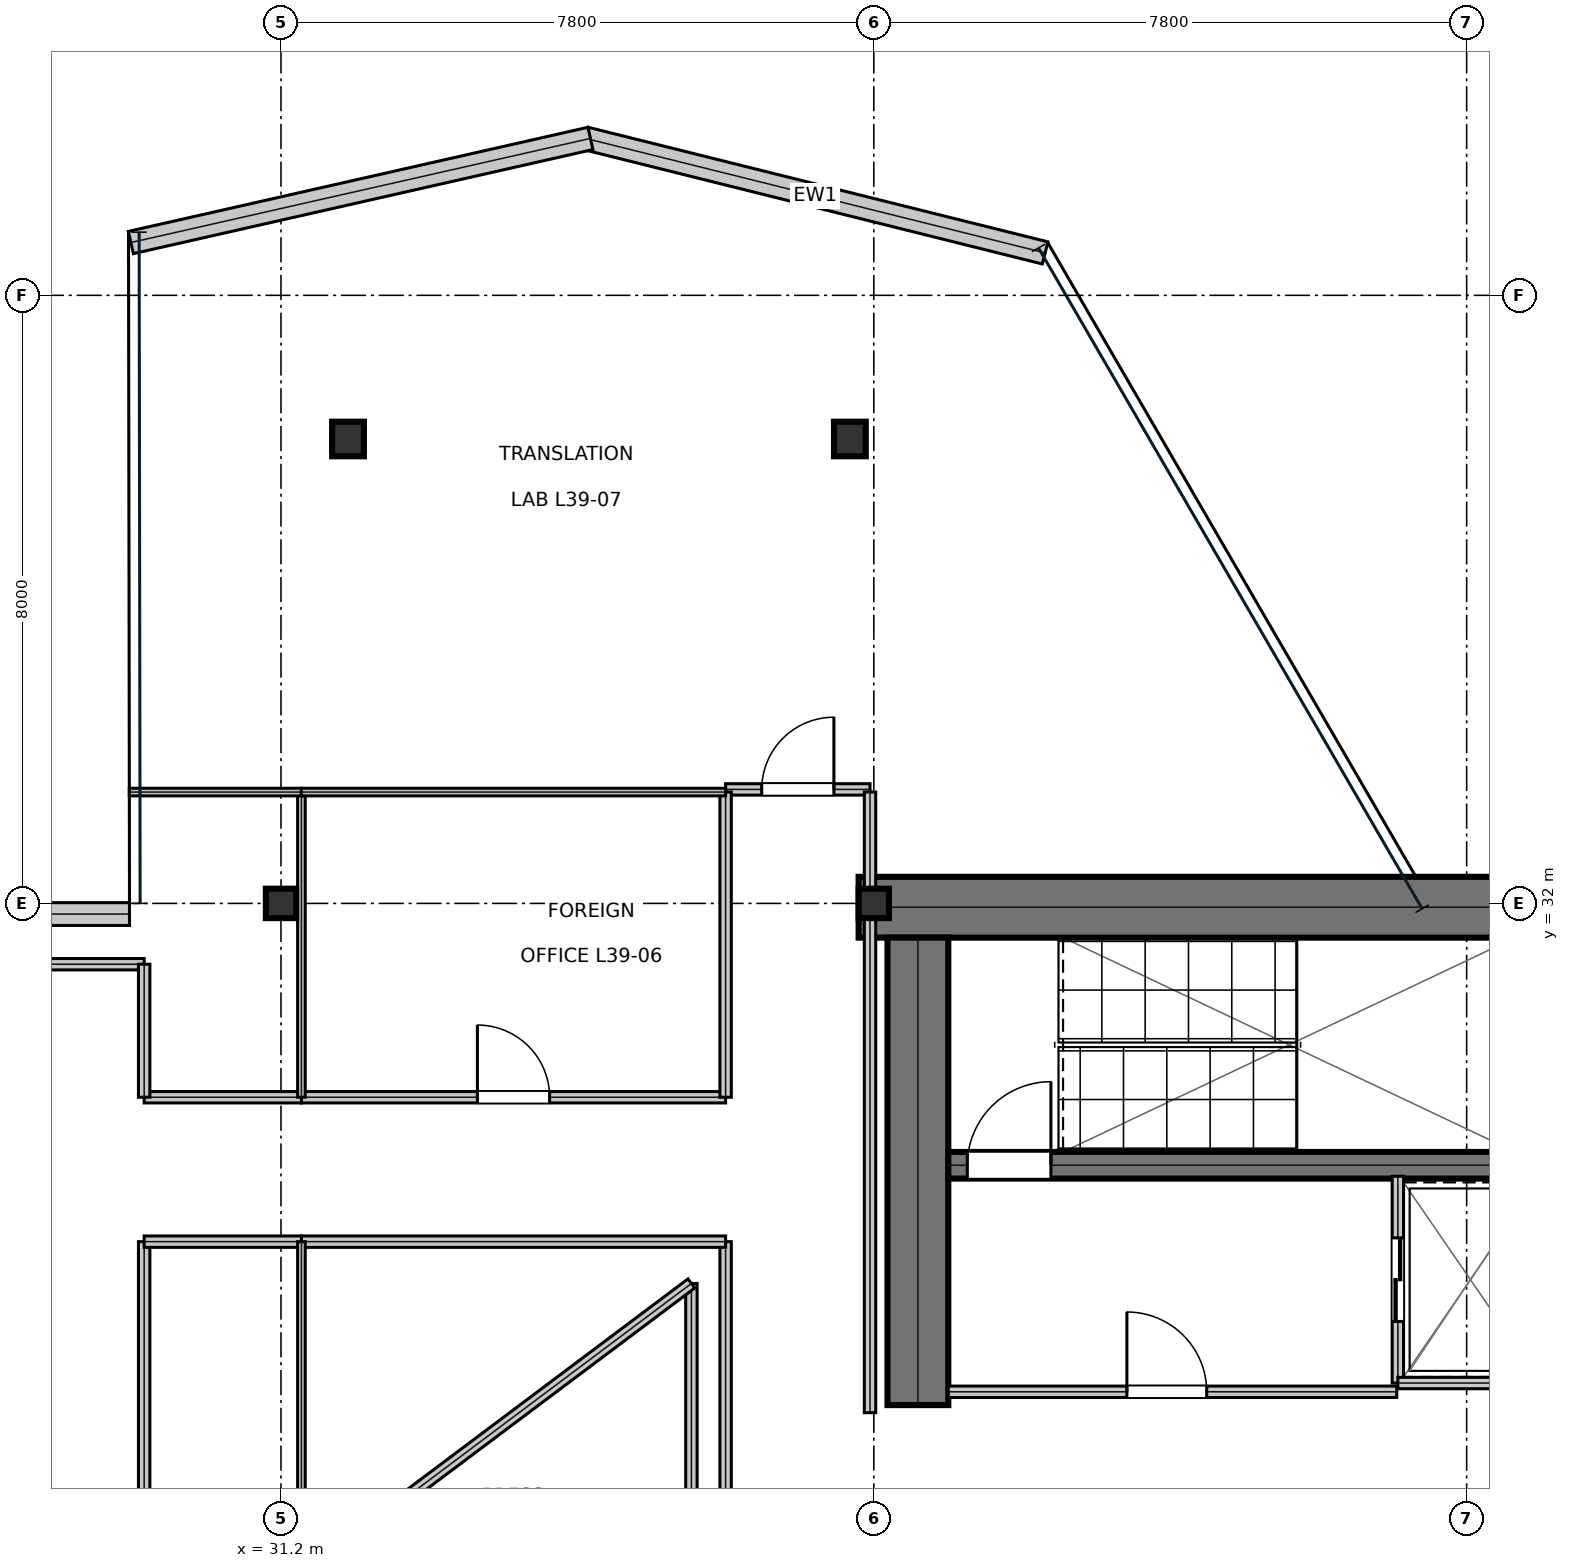
"""IFC4 building model, lengths in metres.
Left out: names, types, materials, properties, quantities, classifications, styles, units other than length and angle.
Written with IfcOpenShell. Run it as: python <this file> out.ifc"""

import sys

from ifc_helpers import new_model, si_unit, direction, frame, frame_2d, origin, origin_2d, place, context, subcontext, project, spatial, rectangle, i_section, extrude, element, fill, save


model = new_model("IFC4")
c1 = context("Model", 3, precision=1e-05, world=origin(), true_north=direction((0.0, 1.0)))
c2 = subcontext(c1, "Body", "Model", "MODEL_VIEW")
j1 = project(units=[si_unit("LENGTHUNIT", "METRE"), si_unit("PLANEANGLEUNIT", "RADIAN")], contexts=[c1])
p1 = place(None, origin())
s1 = spatial("IfcSite", under=j1, at=p1, CompositionType="ELEMENT")
p2 = place(p1, origin())
s2 = spatial("IfcBuilding", under=s1, at=p2, CompositionType="ELEMENT")
p3 = place(p2, frame((0.0, 0.0, 169.5)))
s3 = spatial("IfcBuildingStorey", under=s2, at=p3, CompositionType="ELEMENT", Elevation=169.5)
p4 = place(p3, frame((38.8, 31.95, 0.0), z_axis=(0.0, 0.0, 1.0), x_axis=(1.0, 0.0, 0.0)))
e1 = element("IfcWall", 1, at=p4, inside=s3, PredefinedType="SHEAR", context=c2, shape_type="SweptSolid", body=[
    extrude(rectangle(XDim=16.0, YDim=0.8, at=frame_2d((8.0, 0.0))), origin(), (0.0, 0.0, 1.0), 3.81),
])
p5 = place(p3, frame((39.58, 25.4, 0.0), z_axis=(0.0, 0.0, 1.0), x_axis=(0.0, 1.0, 0.0)))
e2 = element("IfcWall", 2, at=p5, inside=s3, PredefinedType="SHEAR", context=c2, shape_type="SweptSolid", body=[
    extrude(rectangle(XDim=6.15, YDim=0.8, at=frame_2d((3.075, 0.0))), origin(), (0.0, 0.0, 1.0), 3.81),
])
p6 = place(p3, frame((39.98, 28.555, 0.0), z_axis=(0.0, 0.0, 1.0), x_axis=(1.0, 0.0, 0.0)))
e3 = element("IfcWall", 3, at=p6, inside=s3, PredefinedType="SHEAR", context=c2, shape_type="SweptSolid", body=[
    extrude(rectangle(XDim=7.71, YDim=0.35, at=frame_2d((3.855, 0.0))), origin(), (0.0, 0.0, 1.0), 3.81),
])
p7 = place(p6, frame((0.25, 0.0, 0.0)))
e4 = element("IfcOpeningElement", 4, at=p7, cuts=e3, PredefinedType="OPENING", context=c2, shape_type="SweptSolid", body=[
    extrude(rectangle(XDim=1.1, YDim=2.15, at=frame_2d((0.55, 1.075))), frame((0.0, 0.185, 0.0), z_axis=(0.0, -1.0, 0.0), x_axis=(1.0, 0.0, 0.0)), (0.0, 0.0, 1.0), 0.37),
])
for number, where, z_axis, x_axis in (
    (5, (31.2, 32.0, 0.0), (0.0, 0.0, 1.0), (1.0, 0.0, 0.0)),
    (6, (39.0, 32.0, 0.0), (0.0, 0.0, 1.0), (1.0, 0.0, 0.0)),
):
    element("IfcColumn", number, at=place(p3, frame(where, z_axis=z_axis, x_axis=x_axis)), inside=s3, PredefinedType="COLUMN", context=c2, shape_type="SweptSolid", body=[
        extrude(i_section(OverallWidth=0.398, OverallDepth=0.387, WebThickness=0.021, FlangeThickness=0.033, at=origin_2d()), origin(), (0.0, 0.0, 1.0), 4.044),
    ])
for number, where, z_axis, x_axis in (
    (7, (32.082, 38.11, 0.016), (0.0, 0.0, 1.0), (1.0, 0.0, 0.0)),
    (8, (38.685, 38.11, 0.016), (0.0, 0.0, 1.0), (1.0, 0.0, 0.0)),
):
    element("IfcColumn", number, at=place(p3, frame(where, z_axis=z_axis, x_axis=x_axis)), inside=s3, PredefinedType="COLUMN", context=c2, shape_type="SweptSolid", body=[
        extrude(i_section(OverallWidth=0.418, OverallDepth=0.455, WebThickness=0.042, FlangeThickness=0.068, at=origin_2d()), origin(), (0.0, 0.0, 1.0), 4.018),
    ])
p8 = place(p3, frame((41.254, 40.558, 0.0), z_axis=(0.0, 0.0, 1.0), x_axis=(-0.970319679145, 0.241825805619, 0.0)))
e9 = element("IfcWall", 9, at=p8, inside=s3, PredefinedType="STANDARD", context=c2, shape_type="SweptSolid", body=[
    extrude(rectangle(XDim=6.232, YDim=0.3, at=frame_2d((3.116, 0.0))), origin(), (0.0, 0.0, 1.0), 3.81),
])
p9 = place(p3, frame((35.272, 42.064, 0.0), z_axis=(0.0, 0.0, 1.0), x_axis=(-0.975288491541, -0.220935190199, 0.0)))
e10 = element("IfcWall", 10, at=p9, inside=s3, PredefinedType="STANDARD", context=c2, shape_type="SweptSolid", body=[
    extrude(rectangle(XDim=6.2, YDim=0.3, at=frame_2d((3.1, 0.0))), origin(), (0.0, 0.0, 1.0), 3.81),
])
p10 = place(p3, frame((29.207, 31.86, 0.0), z_axis=(0.0, 0.0, 1.0), x_axis=(-1.0, 0.0, 0.0)))
e11 = element("IfcWall", 11, at=p10, inside=s3, PredefinedType="STANDARD", context=c2, shape_type="SweptSolid", body=[
    extrude(rectangle(XDim=2.799, YDim=0.3, at=frame_2d((1.399, 0.0))), origin(), (0.0, 0.0, 1.0), 3.81),
])
p11 = place(p3, frame((39.98, 25.575, 0.0), z_axis=(0.0, 0.0, 1.0), x_axis=(1.0, 0.0, 0.0)))
e12 = element("IfcWall", 12, at=p11, inside=s3, PredefinedType="PARTITIONING", context=c2, shape_type="SweptSolid", body=[
    extrude(rectangle(XDim=5.9, YDim=0.15, at=frame_2d((2.95, 0.0))), origin(), (0.0, 0.0, 1.0), 3.81),
])
p12 = place(p11, frame((2.35, 0.0, 0.0)))
e13 = element("IfcOpeningElement", 13, at=p12, cuts=e12, PredefinedType="OPENING", context=c2, shape_type="SweptSolid", body=[
    extrude(rectangle(XDim=1.05, YDim=2.15, at=frame_2d((0.525, 1.075))), frame((0.0, 0.085, 0.0), z_axis=(0.0, -1.0, 0.0), x_axis=(1.0, 0.0, 0.0)), (0.0, 0.0, 1.0), 0.17),
])
p13 = place(p3, frame((45.895, 25.69, 0.0), z_axis=(0.0, 0.0, 1.0), x_axis=(0.0, 1.0, 0.0)))
e14 = element("IfcWall", 14, at=p13, inside=s3, PredefinedType="PARTITIONING", context=c2, shape_type="SweptSolid", body=[
    extrude(rectangle(XDim=2.72, YDim=0.15, at=frame_2d((1.36, 0.0))), origin(), (0.0, 0.0, 1.0), 3.81),
])
p14 = place(p13, frame((0.81, 0.0, 0.0)))
e15 = element("IfcOpeningElement", 15, at=p14, cuts=e14, PredefinedType="OPENING", context=c2, shape_type="SweptSolid", body=[
    extrude(rectangle(XDim=1.1, YDim=2.15, at=frame_2d((0.55, 1.075))), frame((0.0, 0.085, 0.0), z_axis=(0.0, -1.0, 0.0), x_axis=(1.0, 0.0, 0.0)), (0.0, 0.0, 1.0), 0.17),
])
p15 = place(p3, frame((45.895, 25.69, 0.0), z_axis=(0.0, 0.0, 1.0), x_axis=(1.0, 0.0, 0.0)))
e16 = element("IfcWall", 16, at=p15, inside=s3, PredefinedType="PARTITIONING", context=c2, shape_type="SweptSolid", body=[
    extrude(rectangle(XDim=1.915, YDim=0.15, at=frame_2d((0.958, 0.0))), origin(), (0.0, 0.0, 1.0), 3.81),
])
p16 = place(p3, frame((37.05, 14.535, 0.0), z_axis=(0.0, 0.0, 1.0), x_axis=(0.0, 1.0, 0.0)))
e17 = element("IfcWall", 17, at=p16, inside=s3, PredefinedType="PARTITIONING", context=c2, shape_type="SweptSolid", body=[
    extrude(rectangle(XDim=13.015, YDim=0.15, at=frame_2d((6.508, 0.0))), origin(), (0.0, 0.0, 1.0), 3.19),
])
p17 = place(p16, frame((4.593, 0.0, 0.0)))
e18 = element("IfcOpeningElement", 18, at=p17, cuts=e17, PredefinedType="OPENING", context=c2, shape_type="SweptSolid", body=[
    extrude(rectangle(XDim=0.95, YDim=2.15, at=frame_2d((0.475, 1.075))), frame((0.0, 0.085, 0.0), z_axis=(0.0, -1.0, 0.0), x_axis=(1.0, 0.0, 0.0)), (0.0, 0.0, 1.0), 0.17),
])
p18 = place(p3, frame((29.4, 16.8, 0.0), z_axis=(0.0, 0.0, 1.0), x_axis=(0.0, 1.0, 0.0)))
e19 = element("IfcWall", 19, at=p18, inside=s3, PredefinedType="PARTITIONING", context=c2, shape_type="SweptSolid", body=[
    extrude(rectangle(XDim=10.75, YDim=0.15, at=frame_2d((5.375, 0.0))), origin(), (0.0, 0.0, 1.0), 3.19),
])
p19 = place(p18, frame((4.54, 0.0, 0.0)))
e20 = element("IfcOpeningElement", 20, at=p19, cuts=e19, PredefinedType="OPENING", context=c2, shape_type="SweptSolid", body=[
    extrude(rectangle(XDim=0.95, YDim=2.15, at=frame_2d((0.475, 1.075))), frame((0.0, 0.085, 0.0), z_axis=(0.0, -1.0, 0.0), x_axis=(1.0, 0.0, 0.0)), (0.0, 0.0, 1.0), 0.17),
])
p20 = place(p3, frame((31.469, 29.45, 0.0), z_axis=(0.0, 0.0, 1.0), x_axis=(1.0, 0.0, 0.0)))
e21 = element("IfcWall", 21, at=p20, inside=s3, PredefinedType="PARTITIONING", context=c2, shape_type="SweptSolid", body=[
    extrude(rectangle(XDim=5.581, YDim=0.15, at=frame_2d((2.791, 0.0))), origin(), (0.0, 0.0, 1.0), 3.81),
])
p21 = place(p20, frame((2.315, 0.0, 0.0)))
e22 = element("IfcOpeningElement", 22, at=p21, cuts=e21, PredefinedType="OPENING", context=c2, shape_type="SweptSolid", body=[
    extrude(rectangle(XDim=0.95, YDim=2.15, at=frame_2d((0.475, 1.075))), frame((0.0, 0.085, 0.0), z_axis=(0.0, -1.0, 0.0), x_axis=(1.0, 0.0, 0.0)), (0.0, 0.0, 1.0), 0.17),
])
p22 = place(p3, frame((37.05, 33.5, 0.0), z_axis=(0.0, 0.0, 1.0), x_axis=(1.0, 0.0, 0.0)))
e23 = element("IfcWall", 23, at=p22, inside=s3, PredefinedType="PARTITIONING", context=c2, shape_type="SweptSolid", body=[
    extrude(rectangle(XDim=1.9, YDim=0.15, at=frame_2d((0.95, 0.0))), origin(), (0.0, 0.0, 1.0), 3.19),
])
p23 = place(p22, frame((0.475, 0.0, 0.0)))
e24 = element("IfcOpeningElement", 24, at=p23, cuts=e23, PredefinedType="OPENING", context=c2, shape_type="SweptSolid", body=[
    extrude(rectangle(XDim=0.95, YDim=2.15, at=frame_2d((0.475, 1.075))), frame((0.0, 0.085, 0.0), z_axis=(0.0, -1.0, 0.0), x_axis=(1.0, 0.0, 0.0)), (0.0, 0.0, 1.0), 0.17),
])
p24 = place(p3, frame((31.469, 27.55, 0.0), z_axis=(0.0, 0.0, 1.0), x_axis=(1.0, 0.0, 0.0)))
e25 = element("IfcWall", 25, at=p24, inside=s3, PredefinedType="PARTITIONING", context=c2, shape_type="SweptSolid", body=[
    extrude(rectangle(XDim=5.581, YDim=0.15, at=frame_2d((2.791, 0.0))), origin(), (0.0, 0.0, 1.0), 3.443),
])
for number, where, z_axis, x_axis in (
    (26, (29.4, 27.55, 0.0), (0.0, 0.0, 1.0), (1.0, 0.0, 0.0)),
    (27, (29.4, 29.45, 0.0), (0.0, 0.0, 1.0), (1.0, 0.0, 0.0)),
):
    element("IfcWall", number, at=place(p3, frame(where, z_axis=z_axis, x_axis=x_axis)), inside=s3, PredefinedType="PARTITIONING", context=c2, shape_type="SweptSolid", body=[
        extrude(rectangle(XDim=2.069, YDim=0.15, at=frame_2d((1.035, 0.0))), origin(), (0.0, 0.0, 1.0), 3.19),
    ])
p25 = place(p3, frame((27.5, 31.2, 0.0), z_axis=(0.0, 0.0, 1.0), x_axis=(1.0, 0.0, 0.0)))
e28 = element("IfcWall", 28, at=p25, inside=s3, PredefinedType="PARTITIONING", context=c2, shape_type="SweptSolid", body=[
    extrude(rectangle(XDim=1.9, YDim=0.15, at=frame_2d((0.95, 0.0))), origin(), (0.0, 0.0, 1.0), 3.338),
])
p26 = place(p3, frame((29.4, 29.45, 0.0), z_axis=(0.0, 0.0, 1.0), x_axis=(0.0, 1.0, 0.0)))
e29 = element("IfcWall", 29, at=p26, inside=s3, PredefinedType="PARTITIONING", context=c2, shape_type="SweptSolid", body=[
    extrude(rectangle(XDim=1.75, YDim=0.15, at=frame_2d((0.875, 0.0))), origin(), (0.0, 0.0, 1.0), 3.81),
])
p27 = place(p3, frame((37.05, 29.45, 0.0), z_axis=(0.0, 0.0, 1.0), x_axis=(0.0, 1.0, 0.0)))
e30 = element("IfcWall", 30, at=p27, inside=s3, PredefinedType="PARTITIONING", context=c2, shape_type="SweptSolid", body=[
    extrude(rectangle(XDim=4.015, YDim=0.15, at=frame_2d((2.008, 0.0))), origin(), (0.0, 0.0, 1.0), 3.19),
])
p28 = place(p3, frame((38.95, 25.3, 0.0), z_axis=(0.0, 0.0, 1.0), x_axis=(0.0, 1.0, 0.0)))
e31 = element("IfcWall", 31, at=p28, inside=s3, PredefinedType="PARTITIONING", context=c2, shape_type="SweptSolid", body=[
    extrude(rectangle(XDim=8.165, YDim=0.15, at=frame_2d((4.083, 0.0))), origin(), (0.0, 0.0, 1.0), 3.19),
])
p29 = place(p3, frame((31.469, 14.535, 0.0), z_axis=(0.0, 0.0, 1.0), x_axis=(0.0, 1.0, 0.0)))
e32 = element("IfcWall", 32, at=p29, inside=s3, PredefinedType="PARTITIONING", context=c2, shape_type="SweptSolid", body=[
    extrude(rectangle(XDim=13.015, YDim=0.1, at=frame_2d((6.508, 0.0))), origin(), (0.0, 0.0, 1.0), 3.19),
])
p30 = place(p3, frame((31.469, 29.45, 0.0), z_axis=(0.0, 0.0, 1.0), x_axis=(0.0, 1.0, 0.0)))
e33 = element("IfcWall", 33, at=p30, inside=s3, PredefinedType="PARTITIONING", context=c2, shape_type="SweptSolid", body=[
    extrude(rectangle(XDim=4.015, YDim=0.1, at=frame_2d((2.008, 0.0))), origin(), (0.0, 0.0, 1.0), 3.19),
])
p31 = place(p3, frame((29.205, 33.465, 0.0), z_axis=(0.0, 0.0, 1.0), x_axis=(1.0, 0.0, 0.0)))
e34 = element("IfcWall", 34, at=p31, inside=s3, PredefinedType="PARTITIONING", context=c2, shape_type="SweptSolid", body=[
    extrude(rectangle(XDim=2.264, YDim=0.1, at=frame_2d((1.132, 0.0))), origin(), (0.0, 0.0, 1.0), 3.81),
])
p32 = place(p3, frame((31.469, 33.465, 0.0), z_axis=(0.0, 0.0, 1.0), x_axis=(1.0, 0.0, 0.0)))
e35 = element("IfcWall", 35, at=p32, inside=s3, PredefinedType="PARTITIONING", context=c2, shape_type="SweptSolid", body=[
    extrude(rectangle(XDim=5.581, YDim=0.1, at=frame_2d((2.791, 0.0))), origin(), (0.0, 0.0, 1.0), 3.81),
])
p33 = place(p3, frame((36.6, 21.0, 0.0), z_axis=(0.0, 0.0, 1.0), x_axis=(0.0, 1.0, 0.0)))
e36 = element("IfcWall", 36, at=p33, inside=s3, PredefinedType="MOVABLE", context=c2, shape_type="SweptSolid", body=[
    extrude(rectangle(XDim=6.0, YDim=0.15, at=frame_2d((3.0, 0.0))), origin(), (0.0, 0.0, 1.0), 3.81),
])
p34 = place(p3, frame((36.6, 27.0, 0.0), z_axis=(0.0, 0.0, 1.0), x_axis=(-0.8, -0.6, 0.0)))
e37 = element("IfcWall", 37, at=p34, inside=s3, PredefinedType="MOVABLE", context=c2, shape_type="SweptSolid", body=[
    extrude(rectangle(XDim=5.0, YDim=0.15, at=frame_2d((2.5, 0.0))), origin(), (0.0, 0.0, 1.0), 3.81),
])
p35 = place(p12, origin())
e38 = element("IfcDoor", 38, at=p35, inside=s3, OperationType="SINGLE_SWING_LEFT", PredefinedType="DOOR", context=c2, shape_type="SweptSolid", body=[
    extrude(rectangle(XDim=1.05, YDim=2.15, at=frame_2d((0.525, 1.075))), frame((0.0, 0.025, 0.0), z_axis=(0.0, -1.0, 0.0), x_axis=(1.0, 0.0, 0.0)), (0.0, 0.0, 1.0), 0.05),
])
fill(e13, e38)
p36 = place(p14, frame((1.1, 0.0, 0.0), z_axis=(0.0, 0.0, 1.0), x_axis=(-1.0, 0.0, 0.0)))
e39 = element("IfcDoor", 39, at=p36, inside=s3, OperationType="DOUBLE_DOOR_SLIDING", PredefinedType="DOOR", context=c2, shape_type="SweptSolid", body=[
    extrude(rectangle(XDim=1.1, YDim=2.15, at=frame_2d((0.55, 1.075))), frame((0.0, 0.025, 0.0), z_axis=(0.0, -1.0, 0.0), x_axis=(1.0, 0.0, 0.0)), (0.0, 0.0, 1.0), 0.05),
])
fill(e15, e39)
p37 = place(p21, origin())
e40 = element("IfcDoor", 40, at=p37, inside=s3, OperationType="SINGLE_SWING_LEFT", PredefinedType="DOOR", context=c2, shape_type="SweptSolid", body=[
    extrude(rectangle(XDim=0.95, YDim=2.15, at=frame_2d((0.475, 1.075))), frame((0.0, 0.025, 0.0), z_axis=(0.0, -1.0, 0.0), x_axis=(1.0, 0.0, 0.0)), (0.0, 0.0, 1.0), 0.05),
])
fill(e22, e40)
p38 = place(p23, origin())
e41 = element("IfcDoor", 41, at=p38, inside=s3, OperationType="SINGLE_SWING_RIGHT", PredefinedType="DOOR", context=c2, shape_type="SweptSolid", body=[
    extrude(rectangle(XDim=0.95, YDim=2.15, at=frame_2d((0.475, 1.075))), frame((0.0, 0.025, 0.0), z_axis=(0.0, -1.0, 0.0), x_axis=(1.0, 0.0, 0.0)), (0.0, 0.0, 1.0), 0.05),
])
fill(e24, e41)
p39 = place(p7, origin())
e42 = element("IfcDoor", 42, at=p39, inside=s3, OperationType="SINGLE_SWING_RIGHT", PredefinedType="DOOR", context=c2, shape_type="SweptSolid", body=[
    extrude(rectangle(XDim=1.1, YDim=2.15, at=frame_2d((0.55, 1.075))), frame((0.0, 0.025, 0.0), z_axis=(0.0, -1.0, 0.0), x_axis=(1.0, 0.0, 0.0)), (0.0, 0.0, 1.0), 0.05),
])
fill(e4, e42)
save(model, sys.argv[1])
